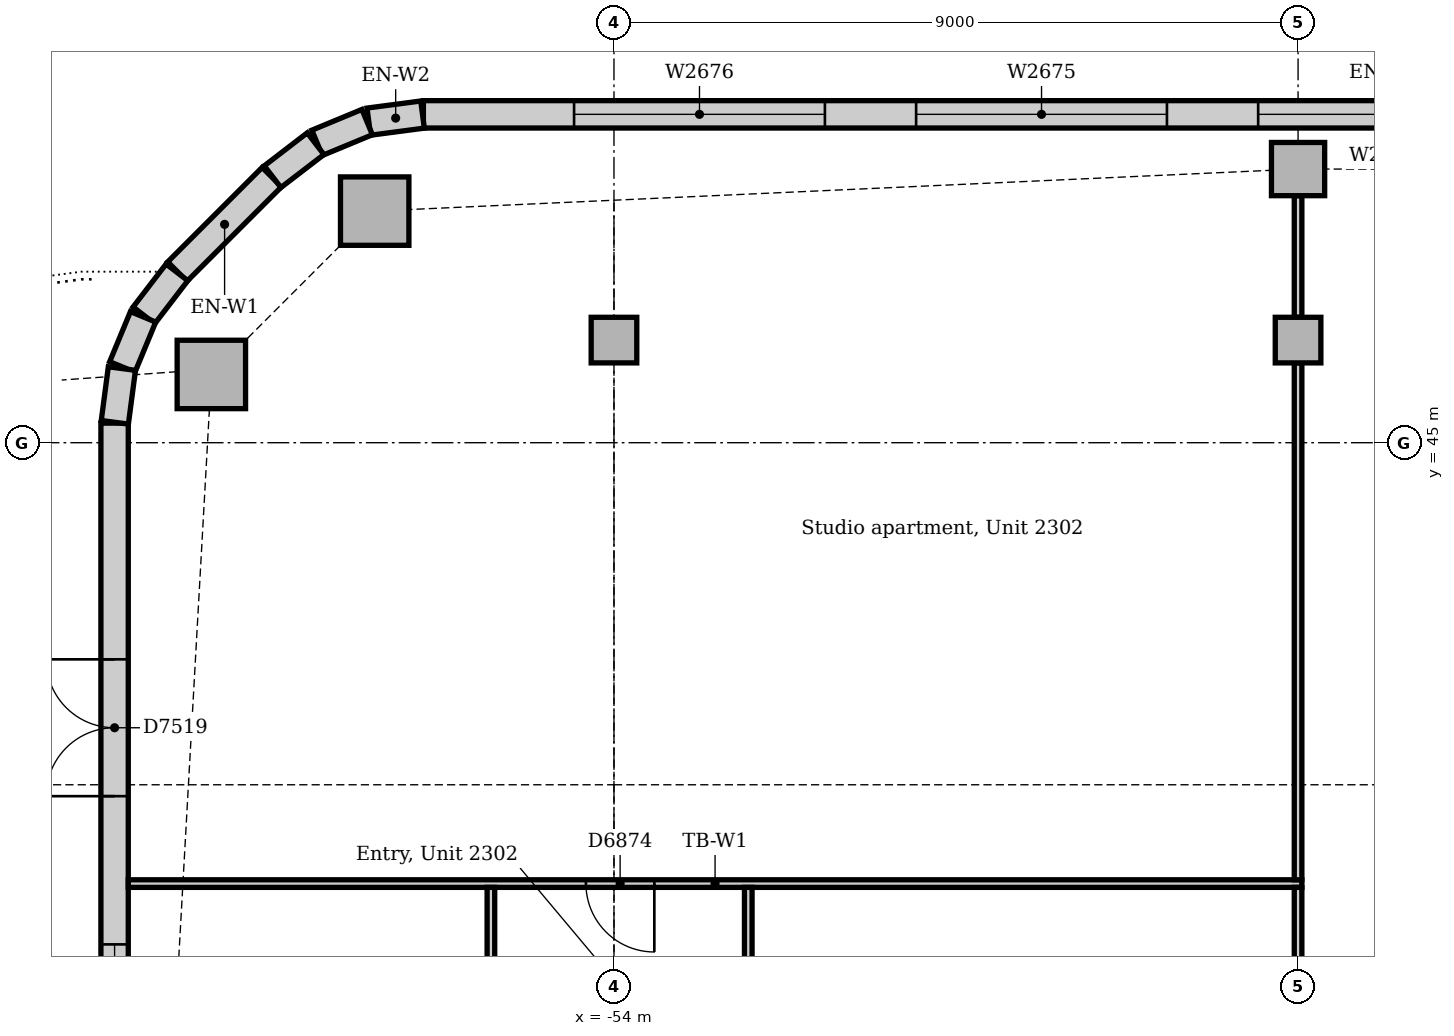
"""IFC4 building model, lengths in metres.
Left out: names, types, materials, properties, quantities, classifications, styles, units other than length and angle.
Written with IfcOpenShell. Run it as: python <this file> out.ifc"""

import sys

from ifc_helpers import new_model, si_unit, direction, frame, frame_2d, origin, origin_2d, place, context, subcontext, project, spatial, rectangle, extrude, element, fill, save


model = new_model("IFC4")
c1 = context("Model", 3, precision=1e-05, world=origin(), true_north=direction((0.0, 1.0)))
c2 = subcontext(c1, "Body", "Model", "MODEL_VIEW")
j1 = project(units=[si_unit("LENGTHUNIT", "METRE"), si_unit("PLANEANGLEUNIT", "RADIAN")], contexts=[c1])
p1 = place(None, origin())
s1 = spatial("IfcSite", under=j1, at=p1, CompositionType="ELEMENT")
p2 = place(p1, origin())
s2 = spatial("IfcBuilding", under=s1, at=p2, CompositionType="ELEMENT")
p3 = place(p2, frame((0.0, 0.0, 100.0)))
s3 = spatial("IfcBuildingStorey", under=s2, at=p3, CompositionType="ELEMENT", Elevation=100.0)
for number, where, z_axis, x_axis in (
    (1, (-57.148, 48.047, -0.15), (0.0, 0.0, 1.0), (1.0, 0.0, 0.0)),
    (2, (-59.297, 45.898, -0.15), (0.0, 0.0, 1.0), (1.0, 0.0, 0.0)),
):
    element("IfcColumn", number, at=place(p3, frame(where, z_axis=z_axis, x_axis=x_axis)), inside=s3, PredefinedType="COLUMN", context=c2, shape_type="SweptSolid", body=[
        extrude(rectangle(XDim=0.9, YDim=0.9, at=origin_2d()), origin(), (0.0, 0.0, 1.0), 4.0),
    ])
p4 = place(p3, frame((-45.0, 48.6, -0.15), z_axis=(0.0, 0.0, 1.0), x_axis=(1.0, 0.0, 0.0)))
e3 = element("IfcColumn", 3, at=p4, inside=s3, PredefinedType="COLUMN", context=c2, shape_type="SweptSolid", body=[
    extrude(rectangle(XDim=0.7, YDim=0.7, at=origin_2d()), origin(), (0.0, 0.0, 1.0), 4.0),
])
for number, where, z_axis, x_axis in (
    (4, (-54.0, 46.35, 0.0), (0.0, 0.0, 1.0), (1.0, 0.0, 0.0)),
    (5, (-45.0, 46.35, 0.0), (0.0, 0.0, 1.0), (1.0, 0.0, 0.0)),
):
    element("IfcColumn", number, at=place(p3, frame(where, z_axis=z_axis, x_axis=x_axis)), inside=s3, PredefinedType="COLUMN", context=c2, shape_type="SweptSolid", body=[
        extrude(rectangle(XDim=0.6, YDim=0.6, at=origin_2d()), origin(), (0.0, 0.0, 1.0), 3.85),
    ])
p5 = place(p3, frame((-31.243, 49.32, 0.0), z_axis=(0.0, 0.0, 1.0), x_axis=(-1.0, 0.0, 0.0)))
e6 = element("IfcWall", 6, at=p5, inside=s3, PredefinedType="STANDARD", context=c2, shape_type="SweptSolid", body=[
    extrude(rectangle(XDim=25.265, YDim=0.36, at=frame_2d((12.632, 0.0))), origin(), (0.0, 0.0, 1.0), 3.85),
])
p6 = place(p5, frame((1.982, 0.0, 0.9)))
e7 = element("IfcOpeningElement", 7, at=p6, cuts=e6, PredefinedType="OPENING", context=c2, shape_type="SweptSolid", body=[
    extrude(rectangle(XDim=3.3, YDim=1.6, at=frame_2d((1.65, 0.8))), frame((0.0, 0.19, 0.0), z_axis=(0.0, -1.0, 0.0), x_axis=(1.0, 0.0, 0.0)), (0.0, 0.0, 1.0), 0.38),
])
p7 = place(p5, frame((6.482, 0.0, 0.9)))
e8 = element("IfcOpeningElement", 8, at=p7, cuts=e6, PredefinedType="OPENING", context=c2, shape_type="SweptSolid", body=[
    extrude(rectangle(XDim=3.3, YDim=1.6, at=frame_2d((1.65, 0.8))), frame((0.0, 0.19, 0.0), z_axis=(0.0, -1.0, 0.0), x_axis=(1.0, 0.0, 0.0)), (0.0, 0.0, 1.0), 0.38),
])
p8 = place(p5, frame((10.982, 0.0, 0.9)))
e9 = element("IfcOpeningElement", 9, at=p8, cuts=e6, PredefinedType="OPENING", context=c2, shape_type="SweptSolid", body=[
    extrude(rectangle(XDim=3.3, YDim=1.6, at=frame_2d((1.65, 0.8))), frame((0.0, 0.19, 0.0), z_axis=(0.0, -1.0, 0.0), x_axis=(1.0, 0.0, 0.0)), (0.0, 0.0, 1.0), 0.38),
])
p9 = place(p5, frame((15.482, 0.0, 0.9)))
e10 = element("IfcOpeningElement", 10, at=p9, cuts=e6, PredefinedType="OPENING", context=c2, shape_type="SweptSolid", body=[
    extrude(rectangle(XDim=3.3, YDim=1.6, at=frame_2d((1.65, 0.8))), frame((0.0, 0.19, 0.0), z_axis=(0.0, -1.0, 0.0), x_axis=(1.0, 0.0, 0.0)), (0.0, 0.0, 1.0), 0.38),
])
p10 = place(p5, frame((19.982, 0.0, 0.9)))
e11 = element("IfcOpeningElement", 11, at=p10, cuts=e6, PredefinedType="OPENING", context=c2, shape_type="SweptSolid", body=[
    extrude(rectangle(XDim=3.3, YDim=1.6, at=frame_2d((1.65, 0.8))), frame((0.0, 0.19, 0.0), z_axis=(0.0, -1.0, 0.0), x_axis=(1.0, 0.0, 0.0)), (0.0, 0.0, 1.0), 0.38),
])
p11 = place(p3, frame((-58.501, 48.494, 0.0), z_axis=(0.0, 0.0, 1.0), x_axis=(-0.707106781187, -0.707106781187, 0.0)))
e12 = element("IfcWall", 12, at=p11, inside=s3, PredefinedType="STANDARD", context=c2, shape_type="SweptSolid", body=[
    extrude(rectangle(XDim=1.757, YDim=0.36, at=frame_2d((0.879, 0.0))), origin(), (0.0, 0.0, 1.0), 3.85),
])
p12 = place(p3, frame((-60.57, 45.257, 0.0), z_axis=(0.0, 0.0, 1.0), x_axis=(0.0, -1.0, 0.0)))
e13 = element("IfcWall", 13, at=p12, inside=s3, PredefinedType="STANDARD", context=c2, shape_type="SweptSolid", body=[
    extrude(rectangle(XDim=21.515, YDim=0.36, at=frame_2d((10.757, 0.0))), origin(), (0.0, 0.0, 1.0), 3.85),
])
p13 = place(p12, frame((3.107, 0.0, 0.0)))
e14 = element("IfcOpeningElement", 14, at=p13, cuts=e13, PredefinedType="OPENING", context=c2, shape_type="SweptSolid", body=[
    extrude(rectangle(XDim=1.8, YDim=2.4, at=frame_2d((0.9, 1.2))), frame((0.0, 0.19, 0.0), z_axis=(0.0, -1.0, 0.0), x_axis=(1.0, 0.0, 0.0)), (0.0, 0.0, 1.0), 0.38),
])
p14 = place(p12, frame((6.857, 0.0, 0.9)))
e15 = element("IfcOpeningElement", 15, at=p14, cuts=e13, PredefinedType="OPENING", context=c2, shape_type="SweptSolid", body=[
    extrude(rectangle(XDim=3.3, YDim=1.6, at=frame_2d((1.65, 0.8))), frame((0.0, 0.19, 0.0), z_axis=(0.0, -1.0, 0.0), x_axis=(1.0, 0.0, 0.0)), (0.0, 0.0, 1.0), 0.38),
])
p15 = place(p12, frame((11.357, 0.0, 0.9)))
e16 = element("IfcOpeningElement", 16, at=p15, cuts=e13, PredefinedType="OPENING", context=c2, shape_type="SweptSolid", body=[
    extrude(rectangle(XDim=3.3, YDim=1.6, at=frame_2d((1.65, 0.8))), frame((0.0, 0.19, 0.0), z_axis=(0.0, -1.0, 0.0), x_axis=(1.0, 0.0, 0.0)), (0.0, 0.0, 1.0), 0.38),
])
p16 = place(p12, frame((15.857, 0.0, 0.9)))
e17 = element("IfcOpeningElement", 17, at=p16, cuts=e13, PredefinedType="OPENING", context=c2, shape_type="SweptSolid", body=[
    extrude(rectangle(XDim=3.3, YDim=1.6, at=frame_2d((1.65, 0.8))), frame((0.0, 0.19, 0.0), z_axis=(0.0, -1.0, 0.0), x_axis=(1.0, 0.0, 0.0)), (0.0, 0.0, 1.0), 0.38),
])
for number, where, z_axis, x_axis in (
    (18, (-56.519, 49.317, 0.0), (0.0, 0.0, 1.0), (-0.991, -0.131, 0.0)),
    (19, (-57.247, 49.218, 0.0), (0.0, 0.0, 1.0), (-0.924, -0.383, 0.0)),
):
    element("IfcWall", number, at=place(p3, frame(where, z_axis=z_axis, x_axis=x_axis)), inside=s3, PredefinedType="STANDARD", context=c2, shape_type="SweptSolid", body=[
        extrude(rectangle(XDim=0.713, YDim=0.36, at=frame_2d((0.356, 0.0))), origin(), (0.0, 0.0, 1.0), 3.85),
    ])
for number, where, z_axis, x_axis in (
    (20, (-57.925, 48.934, 0.0), (0.0, 0.0, 1.0), (-0.793, -0.609, 0.0)),
    (21, (-59.75, 47.241, 0.0), (0.0, 0.0, 1.0), (-0.609, -0.793, 0.0)),
):
    element("IfcWall", number, at=place(p3, frame(where, z_axis=z_axis, x_axis=x_axis)), inside=s3, PredefinedType="STANDARD", context=c2, shape_type="SweptSolid", body=[
        extrude(rectangle(XDim=0.713, YDim=0.36, at=frame_2d((0.357, 0.0))), origin(), (0.0, 0.0, 1.0), 3.85),
    ])
for number, where, z_axis, x_axis in (
    (22, (-60.195, 46.656, 0.0), (0.0, 0.0, 1.0), (-0.383, -0.924, 0.0)),
    (23, (-60.474, 45.976, 0.0), (0.0, 0.0, 1.0), (-0.131, -0.991, 0.0)),
):
    element("IfcWall", number, at=place(p3, frame(where, z_axis=z_axis, x_axis=x_axis)), inside=s3, PredefinedType="STANDARD", context=c2, shape_type="SweptSolid", body=[
        extrude(rectangle(XDim=0.713, YDim=0.36, at=frame_2d((0.356, 0.0))), origin(), (0.0, 0.0, 1.0), 3.85),
    ])
p17 = place(p3, frame((-60.39, 39.2, 0.0), z_axis=(0.0, 0.0, 1.0), x_axis=(1.0, 0.0, 0.0)))
e24 = element("IfcWall", 24, at=p17, inside=s3, PredefinedType="PARTITIONING", context=c2, shape_type="SweptSolid", body=[
    extrude(rectangle(XDim=15.44, YDim=0.1, at=frame_2d((7.72, 0.0))), origin(), (0.0, 0.0, 1.0), 3.85),
])
p18 = place(p17, frame((6.021, 0.0, 0.0)))
e25 = element("IfcOpeningElement", 25, at=p18, cuts=e24, PredefinedType="OPENING", context=c2, shape_type="SweptSolid", body=[
    extrude(rectangle(XDim=0.9, YDim=2.1, at=frame_2d((0.45, 1.05))), frame((0.0, 0.06, 0.0), z_axis=(0.0, -1.0, 0.0), x_axis=(1.0, 0.0, 0.0)), (0.0, 0.0, 1.0), 0.12),
])
p19 = place(p3, frame((-45.0, 39.25, 0.0), z_axis=(0.0, 0.0, 1.0), x_axis=(0.0, 1.0, 0.0)))
e26 = element("IfcWall", 26, at=p19, inside=s3, PredefinedType="PARTITIONING", context=c2, shape_type="SweptSolid", body=[
    extrude(rectangle(XDim=6.8, YDim=0.1, at=frame_2d((3.4, 0.0))), origin(), (0.0, 0.0, 1.0), 3.362),
])
p20 = place(p3, frame((-45.0, 36.3, 0.0), z_axis=(0.0, 0.0, 1.0), x_axis=(0.0, 1.0, 0.0)))
e27 = element("IfcWall", 27, at=p20, inside=s3, PredefinedType="PARTITIONING", context=c2, shape_type="SweptSolid", body=[
    extrude(rectangle(XDim=2.85, YDim=0.1, at=frame_2d((1.425, 0.0))), origin(), (0.0, 0.0, 1.0), 3.362),
])
p21 = place(p3, frame((-45.0, 46.65, 0.0), z_axis=(0.0, 0.0, 1.0), x_axis=(0.0, 1.0, 0.0)))
e28 = element("IfcWall", 28, at=p21, inside=s3, PredefinedType="PARTITIONING", context=c2, shape_type="SweptSolid", body=[
    extrude(rectangle(XDim=1.6, YDim=0.1, at=frame_2d((0.8, 0.0))), origin(), (0.0, 0.0, 1.0), 3.652),
])
p22 = place(p3, frame((-55.619, 36.075, 0.0), z_axis=(0.0, 0.0, 1.0), x_axis=(0.0, 1.0, 0.0)))
e29 = element("IfcWall", 29, at=p22, inside=s3, PredefinedType="PARTITIONING", context=c2, shape_type="SweptSolid", body=[
    extrude(rectangle(XDim=3.075, YDim=0.1, at=frame_2d((1.538, 0.0))), origin(), (0.0, 0.0, 1.0), 3.85),
])
p23 = place(p22, frame((1.1, 0.0, 0.0)))
e30 = element("IfcOpeningElement", 30, at=p23, cuts=e29, PredefinedType="OPENING", context=c2, shape_type="SweptSolid", body=[
    extrude(rectangle(XDim=0.9, YDim=2.1, at=frame_2d((0.45, 1.05))), frame((0.0, 0.06, 0.0), z_axis=(0.0, -1.0, 0.0), x_axis=(1.0, 0.0, 0.0)), (0.0, 0.0, 1.0), 0.12),
])
p24 = place(p3, frame((-52.233, 36.075, 0.0), z_axis=(0.0, 0.0, 1.0), x_axis=(0.0, 1.0, 0.0)))
e31 = element("IfcWall", 31, at=p24, inside=s3, PredefinedType="PARTITIONING", context=c2, shape_type="SweptSolid", body=[
    extrude(rectangle(XDim=3.075, YDim=0.1, at=frame_2d((1.538, 0.0))), origin(), (0.0, 0.0, 1.0), 3.85),
])
p25 = place(p24, frame((1.1, 0.0, 0.0)))
e32 = element("IfcOpeningElement", 32, at=p25, cuts=e31, PredefinedType="OPENING", context=c2, shape_type="SweptSolid", body=[
    extrude(rectangle(XDim=0.9, YDim=2.1, at=frame_2d((0.45, 1.05))), frame((0.0, 0.06, 0.0), z_axis=(0.0, -1.0, 0.0), x_axis=(1.0, 0.0, 0.0)), (0.0, 0.0, 1.0), 0.12),
])
p26 = place(p8, origin())
e33 = element("IfcWindow", 33, at=p26, inside=s3, PartitioningType="SINGLE_PANEL", PredefinedType="WINDOW", context=c2, shape_type="SweptSolid", body=[
    extrude(rectangle(XDim=3.3, YDim=1.6, at=frame_2d((1.65, 0.8))), frame((0.0, 0.13, 0.0), z_axis=(0.0, -1.0, 0.0), x_axis=(1.0, 0.0, 0.0)), (0.0, 0.0, 1.0), 0.06),
])
fill(e9, e33)
p27 = place(p9, origin())
e34 = element("IfcWindow", 34, at=p27, inside=s3, PartitioningType="SINGLE_PANEL", PredefinedType="WINDOW", context=c2, shape_type="SweptSolid", body=[
    extrude(rectangle(XDim=3.3, YDim=1.6, at=frame_2d((1.65, 0.8))), frame((0.0, 0.13, 0.0), z_axis=(0.0, -1.0, 0.0), x_axis=(1.0, 0.0, 0.0)), (0.0, 0.0, 1.0), 0.06),
])
fill(e10, e34)
p28 = place(p10, origin())
e35 = element("IfcWindow", 35, at=p28, inside=s3, PartitioningType="SINGLE_PANEL", PredefinedType="WINDOW", context=c2, shape_type="SweptSolid", body=[
    extrude(rectangle(XDim=3.3, YDim=1.6, at=frame_2d((1.65, 0.8))), frame((0.0, 0.13, 0.0), z_axis=(0.0, -1.0, 0.0), x_axis=(1.0, 0.0, 0.0)), (0.0, 0.0, 1.0), 0.06),
])
fill(e11, e35)
p29 = place(p13, frame((1.8, 0.0, 0.0), z_axis=(0.0, 0.0, 1.0), x_axis=(-1.0, 0.0, 0.0)))
e36 = element("IfcDoor", 36, at=p29, inside=s3, OperationType="DOUBLE_DOOR_SINGLE_SWING", PredefinedType="DOOR", context=c2, shape_type="SweptSolid", body=[
    extrude(rectangle(XDim=1.8, YDim=2.4, at=frame_2d((0.9, 1.2))), frame((0.0, -0.07, 0.0), z_axis=(0.0, -1.0, 0.0), x_axis=(1.0, 0.0, 0.0)), (0.0, 0.0, 1.0), 0.05),
])
fill(e14, e36)
p30 = place(p14, origin())
e37 = element("IfcWindow", 37, at=p30, inside=s3, PartitioningType="SINGLE_PANEL", PredefinedType="WINDOW", context=c2, shape_type="SweptSolid", body=[
    extrude(rectangle(XDim=3.3, YDim=1.6, at=frame_2d((1.65, 0.8))), frame((0.0, 0.13, 0.0), z_axis=(0.0, -1.0, 0.0), x_axis=(1.0, 0.0, 0.0)), (0.0, 0.0, 1.0), 0.06),
])
fill(e15, e37)
p31 = place(p18, frame((0.9, 0.0, 0.0), z_axis=(0.0, 0.0, 1.0), x_axis=(-1.0, 0.0, 0.0)))
e38 = element("IfcDoor", 38, at=p31, inside=s3, OperationType="SINGLE_SWING_LEFT", PredefinedType="DOOR", context=c2, shape_type="SweptSolid", body=[
    extrude(rectangle(XDim=0.9, YDim=2.1, at=frame_2d((0.45, 1.05))), frame((0.0, 0.025, 0.0), z_axis=(0.0, -1.0, 0.0), x_axis=(1.0, 0.0, 0.0)), (0.0, 0.0, 1.0), 0.05),
])
fill(e25, e38)
save(model, sys.argv[1])
